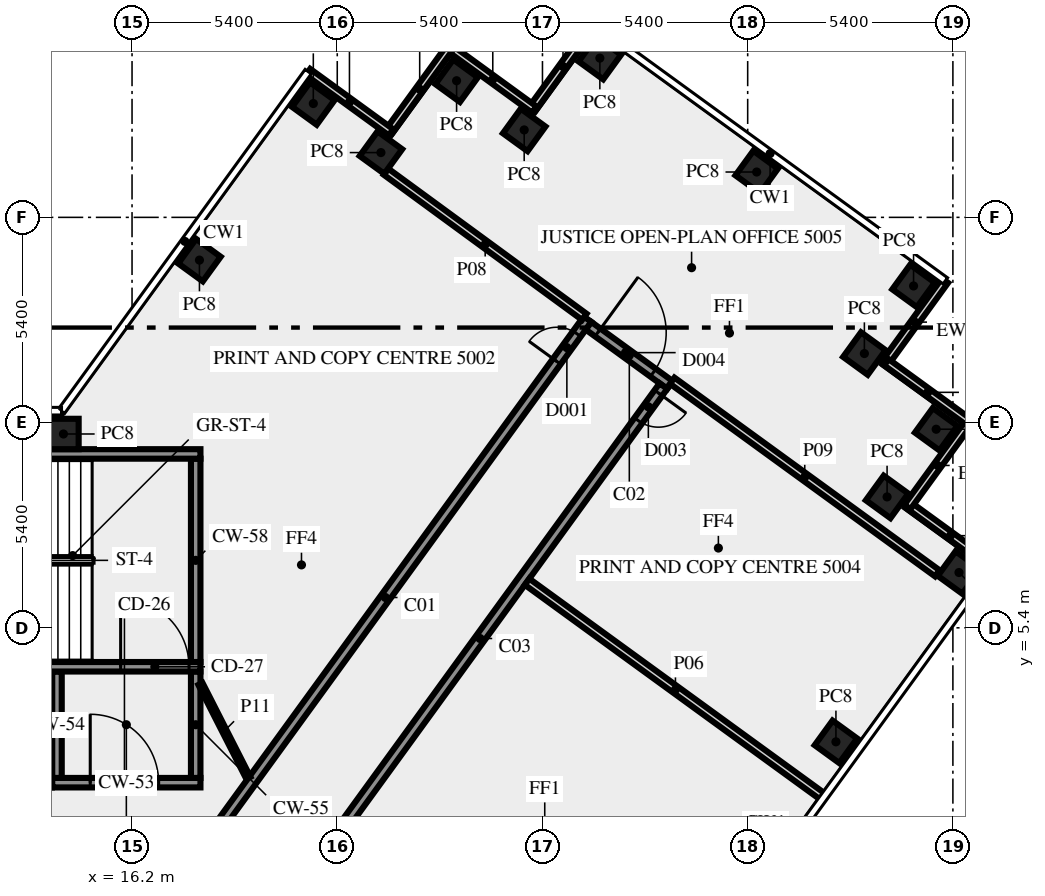
"""IFC4 building model, lengths in metres.
Left out: names, types, materials, properties, quantities, classifications, styles, units other than length and angle.
Written with IfcOpenShell. Run it as: python <this file> out.ifc"""

import sys

from ifc_helpers import new_model, si_unit, direction, frame, frame_2d, origin, origin_2d, place, context, subcontext, project, spatial, rectangle, extrude, element, fill, save


model = new_model("IFC4")
c1 = context("Model", 3, precision=1e-05, world=origin(), true_north=direction((0.0, 1.0)))
c2 = subcontext(c1, "Body", "Model", "MODEL_VIEW")
j1 = project(units=[si_unit("LENGTHUNIT", "METRE"), si_unit("PLANEANGLEUNIT", "RADIAN")], contexts=[c1])
p1 = place(None, origin())
s1 = spatial("IfcSite", under=j1, at=p1, CompositionType="ELEMENT")
p2 = place(p1, origin())
s2 = spatial("IfcBuilding", under=s1, at=p2, CompositionType="ELEMENT")
p3 = place(p2, frame((0.0, 0.0, 214.0)))
s3 = spatial("IfcBuildingStorey", under=s2, at=p3, CompositionType="ELEMENT", Elevation=214.0)
for number, where, z_axis, x_axis in (
    (1, (34.722, 2.4, 0.0), (0.0, 0.0, 1.0), (0.588, 0.809, 0.0)),
    (2, (37.96, 6.855, 0.0), (0.0, 0.0, 1.0), (0.588, 0.809, 0.0)),
    (3, (36.068, 8.844, 0.0), (0.0, 0.0, 1.0), (0.588, 0.809, 0.0)),
    (4, (37.36, 10.625, 0.0), (0.0, 0.0, 1.0), (0.588, 0.809, 0.0)),
    (5, (35.471, 12.616, 0.0), (0.0, 0.0, 1.0), (-0.809, 0.588, 0.0)),
    (6, (36.765, 14.395, 0.0), (0.0, 0.0, 1.0), (-0.809, 0.588, 0.0)),
    (7, (32.637, 17.393, 0.0), (0.0, 0.0, 1.0), (-0.809, 0.588, 0.0)),
    (8, (28.51, 20.39, 0.0), (0.0, 0.0, 1.0), (-0.588, -0.809, 0.0)),
    (9, (26.519, 18.5, 0.0), (0.0, 0.0, 1.0), (-0.809, 0.588, 0.0)),
    (10, (24.74, 19.795, 0.0), (0.0, 0.0, 1.0), (-0.588, -0.809, 0.0)),
    (11, (22.749, 17.904, 0.0), (0.0, 0.0, 1.0), (-0.588, -0.809, 0.0)),
    (12, (20.97, 19.195, 0.0), (0.0, 0.0, 1.0), (-0.588, -0.809, 0.0)),
    (13, (17.974, 15.075, 0.0), (0.0, 0.0, 1.0), (-0.588, -0.809, 0.0)),
    (14, (14.395, 10.5, 0.0), (0.0, 0.0, 1.0), (-1.0, 0.0, 0.0)),
):
    element("IfcColumn", number, at=place(p3, frame(where, z_axis=z_axis, x_axis=x_axis)), inside=s3, PredefinedType="COLUMN", context=c2, shape_type="SweptSolid", body=[
        extrude(rectangle(XDim=0.8, YDim=0.8, at=origin_2d()), origin(), (0.0, 0.0, 1.0), 3.65),
    ])
for number, where, z_axis, x_axis in (
    (15, (36.005, 12.352, 0.0), (0.0, 0.0, 1.0), (0.588, 0.809, 0.0)),
    (16, (28.334, 21.262, 0.0), (0.0, 0.0, 1.0), (-0.588, -0.809, 0.0)),
):
    element("IfcWall", number, at=place(p3, frame(where, z_axis=z_axis, x_axis=x_axis)), inside=s3, PredefinedType="SOLIDWALL", context=c2, shape_type="SweptSolid", body=[
        extrude(rectangle(XDim=2.7, YDim=0.2, at=frame_2d((1.35, 0.0))), origin(), (0.0, 0.0, 1.0), 3.65),
    ])
p4 = place(p3, frame((26.785, 19.036, 0.0), z_axis=(0.0, 0.0, 1.0), x_axis=(-0.809064397168, 0.587720002413, 0.0)))
e17 = element("IfcWall", 17, at=p4, inside=s3, PredefinedType="SOLIDWALL", context=c2, shape_type="SweptSolid", body=[
    extrude(rectangle(XDim=2.7, YDim=0.2, at=frame_2d((1.35, 0.0))), origin(), (0.0, 0.0, 1.0), 3.65),
])
for number, where, z_axis, x_axis in (
    (18, (24.563, 20.665, 0.0), (0.0, 0.0, 1.0), (-0.588, -0.809, 0.0)),
    (19, (23.013, 18.438, 0.0), (0.0, 0.0, 1.0), (-0.809, 0.588, 0.0)),
    (20, (38.829, 7.031, 0.0), (0.0, 0.0, 1.0), (-0.809, 0.588, 0.0)),
    (21, (36.602, 8.58, 0.0), (0.0, 0.0, 1.0), (0.588, 0.809, 0.0)),
    (22, (38.231, 10.802, 0.0), (0.0, 0.0, 1.0), (-0.809, 0.588, 0.0)),
):
    element("IfcWall", number, at=place(p3, frame(where, z_axis=z_axis, x_axis=x_axis)), inside=s3, PredefinedType="SOLIDWALL", context=c2, shape_type="SweptSolid", body=[
        extrude(rectangle(XDim=2.7, YDim=0.2, at=frame_2d((1.35, 0.0))), origin(), (0.0, 0.0, 1.0), 3.65),
    ])
p5 = place(p3, frame((14.1, 1.325, 0.0), z_axis=(0.0, 0.0, 1.0), x_axis=(1.0, 0.0, 0.0)))
e23 = element("IfcWall", 23, at=p5, inside=s3, PredefinedType="SHEAR", context=c2, shape_type="SweptSolid", body=[
    extrude(rectangle(XDim=3.9, YDim=0.25, at=frame_2d((1.95, 0.0))), origin(), (0.0, 0.0, 1.0), 3.65),
])
p6 = place(p5, frame((1.0, 0.0, 0.0)))
e24 = element("IfcOpeningElement", 24, at=p6, cuts=e23, PredefinedType="OPENING", context=c2, shape_type="SweptSolid", body=[
    extrude(rectangle(XDim=1.8, YDim=2.1, at=frame_2d((0.9, 1.05))), frame((0.0, 0.135, 0.0), z_axis=(0.0, -1.0, 0.0), x_axis=(1.0, 0.0, 0.0)), (0.0, 0.0, 1.0), 0.27),
])
for number, where, z_axis, x_axis in (
    (25, (14.225, 1.45, 0.0), (0.0, 0.0, 1.0), (0.0, 1.0, 0.0)),
    (26, (17.875, 1.45, 0.0), (0.0, 0.0, 1.0), (0.0, 1.0, 0.0)),
):
    element("IfcWall", number, at=place(p3, frame(where, z_axis=z_axis, x_axis=x_axis)), inside=s3, PredefinedType="SHEAR", context=c2, shape_type="SweptSolid", body=[
        extrude(rectangle(XDim=2.8, YDim=0.25, at=frame_2d((1.4, 0.0))), origin(), (0.0, 0.0, 1.0), 3.65),
    ])
p7 = place(p3, frame((7.5, 4.375, 0.0), z_axis=(0.0, 0.0, 1.0), x_axis=(1.0, 0.0, 0.0)))
e27 = element("IfcWall", 27, at=p7, inside=s3, PredefinedType="SHEAR", context=c2, shape_type="SweptSolid", body=[
    extrude(rectangle(XDim=10.5, YDim=0.25, at=frame_2d((5.25, 0.0))), origin(), (0.0, 0.0, 1.0), 3.65),
])
p8 = place(p7, frame((8.4, 0.0, 0.0)))
e28 = element("IfcOpeningElement", 28, at=p8, cuts=e27, PredefinedType="OPENING", context=c2, shape_type="SweptSolid", body=[
    extrude(rectangle(XDim=1.8, YDim=2.1, at=frame_2d((0.9, 1.05))), frame((0.0, 0.135, 0.0), z_axis=(0.0, -1.0, 0.0), x_axis=(1.0, 0.0, 0.0)), (0.0, 0.0, 1.0), 0.27),
])
p9 = place(p3, frame((17.875, 4.5, 0.0), z_axis=(0.0, 0.0, 1.0), x_axis=(0.0, 1.0, 0.0)))
e29 = element("IfcWall", 29, at=p9, inside=s3, PredefinedType="SHEAR", context=c2, shape_type="SweptSolid", body=[
    extrude(rectangle(XDim=5.35, YDim=0.25, at=frame_2d((2.675, 0.0))), origin(), (0.0, 0.0, 1.0), 3.65),
])
p10 = place(p3, frame((7.5, 9.975, 0.0), z_axis=(0.0, 0.0, 1.0), x_axis=(1.0, 0.0, 0.0)))
e30 = element("IfcWall", 30, at=p10, inside=s3, PredefinedType="SHEAR", context=c2, shape_type="SweptSolid", body=[
    extrude(rectangle(XDim=10.5, YDim=0.25, at=frame_2d((5.25, 0.0))), origin(), (0.0, 0.0, 1.0), 3.65),
])
p11 = place(p10, frame((2.0, 0.0, 1.0)))
e31 = element("IfcOpeningElement", 31, at=p11, cuts=e30, PredefinedType="OPENING", context=c2, shape_type="SweptSolid", body=[
    extrude(rectangle(XDim=1.2, YDim=1.2, at=frame_2d((0.6, 0.6))), frame((0.0, 0.135, 0.0), z_axis=(0.0, -1.0, 0.0), x_axis=(1.0, 0.0, 0.0)), (0.0, 0.0, 1.0), 0.27),
])
p12 = place(p3, frame((17.545, -1.125, 0.0), z_axis=(0.0, 0.0, 1.0), x_axis=(0.58779555165, 0.809009511354, 0.0)))
e32 = element("IfcWall", 32, at=p12, inside=s3, PredefinedType="SOLIDWALL", context=c2, shape_type="SweptSolid", body=[
    extrude(rectangle(XDim=18.103, YDim=0.25, at=frame_2d((9.052, 0.0))), origin(), (0.0, 0.0, 1.0), 3.65),
])
p13 = place(p12, frame((16.728, 0.0, 0.0)))
e33 = element("IfcOpeningElement", 33, at=p13, cuts=e32, PredefinedType="OPENING", context=c2, shape_type="SweptSolid", body=[
    extrude(rectangle(XDim=0.9, YDim=2.1, at=frame_2d((0.45, 1.05))), frame((0.0, 0.135, 0.0), z_axis=(0.0, -1.0, 0.0), x_axis=(1.0, 0.0, 0.0)), (0.0, 0.0, 1.0), 0.27),
])
p14 = place(p3, frame((28.213, 13.346, 0.0), z_axis=(0.0, 0.0, 1.0), x_axis=(0.809006914995, -0.587799125119, 0.0)))
e34 = element("IfcWall", 34, at=p14, inside=s3, PredefinedType="SOLIDWALL", context=c2, shape_type="SweptSolid", body=[
    extrude(rectangle(XDim=2.65, YDim=0.25, at=frame_2d((1.325, 0.0))), origin(), (0.0, 0.0, 1.0), 3.65),
])
p15 = place(p14, frame((0.3, 0.0, 0.0)))
e35 = element("IfcOpeningElement", 35, at=p15, cuts=e34, PredefinedType="OPENING", context=c2, shape_type="SweptSolid", body=[
    extrude(rectangle(XDim=1.8, YDim=2.1, at=frame_2d((0.9, 1.05))), frame((0.0, 0.135, 0.0), z_axis=(0.0, -1.0, 0.0), x_axis=(1.0, 0.0, 0.0)), (0.0, 0.0, 1.0), 0.27),
])
p16 = place(p3, frame((30.183, 11.761, 0.0), z_axis=(0.0, 0.0, 1.0), x_axis=(-0.587781762867, -0.80901952958, 0.0)))
e36 = element("IfcWall", 36, at=p16, inside=s3, PredefinedType="SOLIDWALL", context=c2, shape_type="SweptSolid", body=[
    extrude(rectangle(XDim=16.42, YDim=0.25, at=frame_2d((8.21, 0.0))), origin(), (0.0, 0.0, 1.0), 3.65),
])
p17 = place(p16, frame((14.988, 0.0, 0.0)))
e37 = element("IfcOpeningElement", 37, at=p17, cuts=e36, PredefinedType="OPENING", context=c2, shape_type="SweptSolid", body=[
    extrude(rectangle(XDim=0.9, YDim=2.1, at=frame_2d((0.45, 1.05))), frame((0.0, 0.135, 0.0), z_axis=(0.0, -1.0, 0.0), x_axis=(1.0, 0.0, 0.0)), (0.0, 0.0, 1.0), 0.27),
])
p18 = place(p16, frame((0.225, 0.0, 0.0)))
e38 = element("IfcOpeningElement", 38, at=p18, cuts=e36, PredefinedType="OPENING", context=c2, shape_type="SweptSolid", body=[
    extrude(rectangle(XDim=0.9, YDim=2.1, at=frame_2d((0.45, 1.05))), frame((0.0, 0.135, 0.0), z_axis=(0.0, -1.0, 0.0), x_axis=(1.0, 0.0, 0.0)), (0.0, 0.0, 1.0), 0.27),
])
p19 = place(p3, frame((34.403, 0.938, 0.0), z_axis=(0.0, 0.0, 1.0), x_axis=(-0.808990890476, 0.587821179549, 0.0)))
e39 = element("IfcWall", 39, at=p19, inside=s3, PredefinedType="SOLIDWALL", context=c2, shape_type="SweptSolid", body=[
    extrude(rectangle(XDim=9.651, YDim=0.2, at=frame_2d((4.826, 0.0))), origin(), (0.0, 0.0, 1.0), 2.85),
])
p20 = place(p3, frame((22.884, 17.401, 0.0), z_axis=(0.0, 0.0, 1.0), x_axis=(0.80698686941, -0.590569380005, 0.0)))
e40 = element("IfcWall", 40, at=p20, inside=s3, PredefinedType="SOLIDWALL", context=c2, shape_type="SweptSolid", body=[
    extrude(rectangle(XDim=6.465, YDim=0.2, at=frame_2d((3.232, 0.0))), origin(), (0.0, 0.0, 1.0), 3.65),
])
p21 = place(p3, frame((30.415, 11.902, 0.0), z_axis=(0.0, 0.0, 1.0), x_axis=(0.809012783133, -0.587791048526, 0.0)))
e41 = element("IfcWall", 41, at=p21, inside=s3, PredefinedType="SOLIDWALL", context=c2, shape_type="SweptSolid", body=[
    extrude(rectangle(XDim=8.62, YDim=0.2, at=frame_2d((4.31, 0.0))), origin(), (0.0, 0.0, 1.0), 3.65),
])
p22 = place(p3, frame((18.0, 3.925, 0.0), z_axis=(0.0, 0.0, 1.0), x_axis=(0.453950796792, -0.891026752736, 0.0)))
e42 = element("IfcWall", 42, at=p22, inside=s3, PredefinedType="PARTITIONING", context=c2, shape_type="SweptSolid", body=[
    extrude(rectangle(XDim=2.778, YDim=0.12, at=frame_2d((1.389, 0.0))), origin(), (0.0, 0.0, 1.0), 3.65),
])
p23 = place(p6, origin())
e43 = element("IfcDoor", 43, at=p23, inside=s3, OperationType="DOUBLE_DOOR_SINGLE_SWING", PredefinedType="DOOR", context=c2, shape_type="SweptSolid", body=[
    extrude(rectangle(XDim=1.8, YDim=2.1, at=frame_2d((0.9, 1.05))), frame((0.0, 0.025, 0.0), z_axis=(0.0, -1.0, 0.0), x_axis=(1.0, 0.0, 0.0)), (0.0, 0.0, 1.0), 0.05),
])
fill(e24, e43)
p24 = place(p8, origin())
e44 = element("IfcDoor", 44, at=p24, inside=s3, OperationType="DOUBLE_DOOR_SINGLE_SWING", PredefinedType="DOOR", context=c2, shape_type="SweptSolid", body=[
    extrude(rectangle(XDim=1.8, YDim=2.1, at=frame_2d((0.9, 1.05))), frame((0.0, 0.025, 0.0), z_axis=(0.0, -1.0, 0.0), x_axis=(1.0, 0.0, 0.0)), (0.0, 0.0, 1.0), 0.05),
])
fill(e28, e44)
p25 = place(p15, origin())
e45 = element("IfcDoor", 45, at=p25, inside=s3, OperationType="DOUBLE_DOOR_SINGLE_SWING", PredefinedType="DOOR", context=c2, shape_type="SweptSolid", body=[
    extrude(rectangle(XDim=1.8, YDim=2.1, at=frame_2d((0.9, 1.05))), frame((0.0, 0.025, 0.0), z_axis=(0.0, -1.0, 0.0), x_axis=(1.0, 0.0, 0.0)), (0.0, 0.0, 1.0), 0.05),
])
fill(e35, e45)
p26 = place(p13, origin())
e46 = element("IfcDoor", 46, at=p26, inside=s3, OperationType="SINGLE_SWING_RIGHT", PredefinedType="DOOR", context=c2, shape_type="SweptSolid", body=[
    extrude(rectangle(XDim=0.9, YDim=2.1, at=frame_2d((0.45, 1.05))), frame((0.0, 0.025, 0.0), z_axis=(0.0, -1.0, 0.0), x_axis=(1.0, 0.0, 0.0)), (0.0, 0.0, 1.0), 0.05),
])
fill(e33, e46)
p27 = place(p18, origin())
e47 = element("IfcDoor", 47, at=p27, inside=s3, OperationType="SINGLE_SWING_LEFT", PredefinedType="DOOR", context=c2, shape_type="SweptSolid", body=[
    extrude(rectangle(XDim=0.9, YDim=2.1, at=frame_2d((0.45, 1.05))), frame((0.0, 0.025, 0.0), z_axis=(0.0, -1.0, 0.0), x_axis=(1.0, 0.0, 0.0)), (0.0, 0.0, 1.0), 0.05),
])
fill(e38, e47)
save(model, sys.argv[1])
